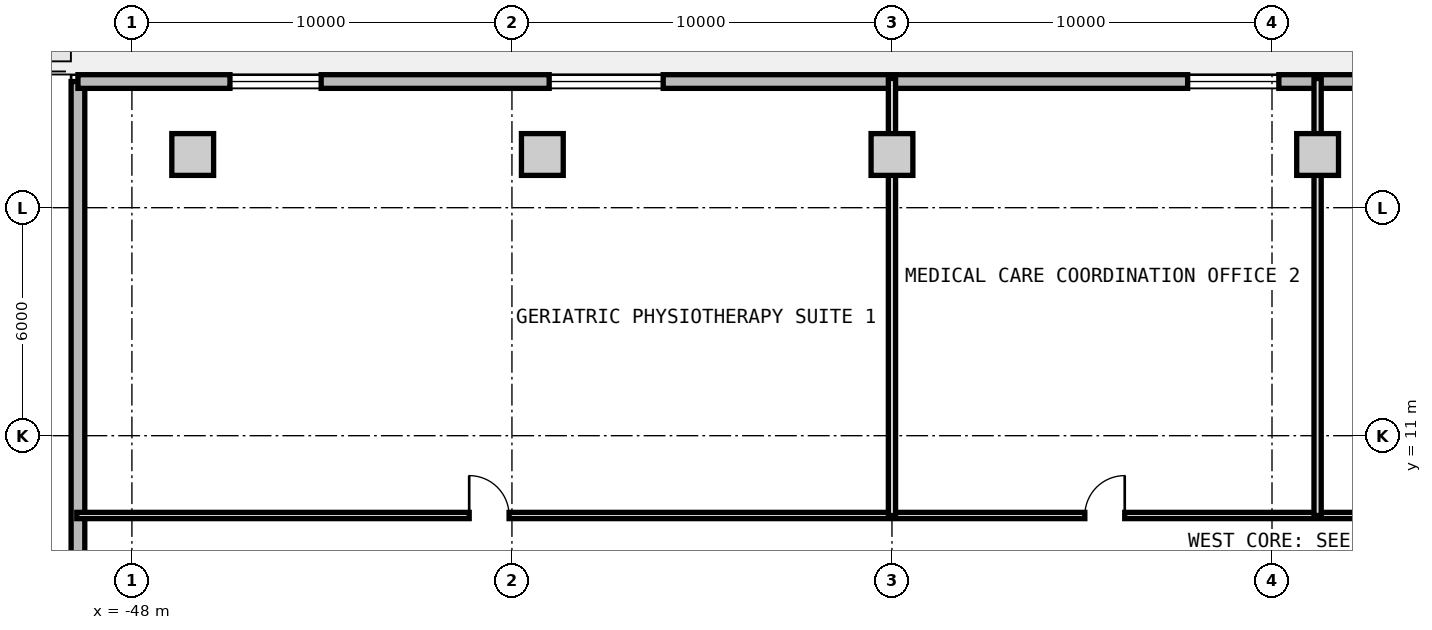
"""IFC4 building model, lengths in metres.
Left out: names, types, materials, properties, quantities, classifications, styles, units other than length and angle.
Written with IfcOpenShell. Run it as: python <this file> out.ifc"""

import sys

from ifc_helpers import new_model, si_unit, direction, frame, frame_2d, origin, origin_2d, place, context, subcontext, project, spatial, rectangle, extrude, source, transform, mapped, element, fill, save


model = new_model("IFC4")
c1 = context("Model", 3, precision=1e-05, world=origin(), true_north=direction((0.0, 1.0)))
c2 = subcontext(c1, "Body", "Model", "MODEL_VIEW")
j1 = project(units=[si_unit("LENGTHUNIT", "METRE"), si_unit("PLANEANGLEUNIT", "RADIAN")], contexts=[c1])
p1 = place(None, origin())
s1 = spatial("IfcSite", under=j1, at=p1, CompositionType="ELEMENT")
p2 = place(p1, origin())
s2 = spatial("IfcBuilding", under=s1, at=p2, CompositionType="ELEMENT")
p3 = place(p2, frame((0.0, 0.0, 12.6)))
s3 = spatial("IfcBuildingStorey", under=s2, at=p3, CompositionType="ELEMENT", Elevation=12.6)
m1 = source(origin(), c2, "Body", "SweptSolid", [
    extrude(rectangle(XDim=1.1, YDim=1.1, at=origin_2d()), origin(), (0.0, 0.0, 1.0), 4.2),
])
for number, where, z_axis, x_axis in (
    (1, (-46.4, 18.4, 0.0), (0.0, 0.0, 1.0), (1.0, 0.0, 0.0)),
    (2, (-37.2, 18.4, 0.0), (0.0, 0.0, 1.0), (1.0, 0.0, 0.0)),
    (3, (-28.0, 18.4, 0.0), (0.0, 0.0, 1.0), (1.0, 0.0, 0.0)),
    (4, (-16.8, 18.4, 0.0), (0.0, 0.0, 1.0), (1.0, 0.0, 0.0)),
):
    element("IfcColumn", number, at=place(p3, frame(where, z_axis=z_axis, x_axis=x_axis)), inside=s3, PredefinedType="COLUMN", context=c2, shape_type="MappedRepresentation", body=[
        mapped(m1, transform((0.0, 0.0, 0.0), x_axis=(1.0, 0.0, 0.0), y_axis=(0.0, 1.0, 0.0), z_axis=(0.0, 0.0, 1.0), scale=1.0)),
    ])
m2 = source(origin(), c2, "Body", "SweptSolid", [
    extrude(rectangle(XDim=40.64, YDim=0.36, at=frame_2d((20.32, 0.0))), origin(), (0.0, 0.0, 1.0), 3.88),
])
p4 = place(p3, frame((-49.42, -20.32, 0.0), z_axis=(0.0, 0.0, 1.0), x_axis=(0.0, 1.0, 0.0)))
e5 = element("IfcWall", 5, at=p4, inside=s3, PredefinedType="SOLIDWALL", context=c2, shape_type="MappedRepresentation", body=[
    mapped(m2, transform((0.0, 0.0, 0.0), x_axis=(1.0, 0.0, 0.0), y_axis=(0.0, 1.0, 0.0), z_axis=(0.0, 0.0, 1.0), scale=1.0)),
])
p5 = place(p4, frame((12.4, 0.0, 0.85)))
e6 = element("IfcOpeningElement", 6, at=p5, cuts=e5, PredefinedType="OPENING", context=c2, shape_type="SweptSolid", body=[
    extrude(rectangle(XDim=3.0, YDim=2.1, at=frame_2d((1.5, 1.05))), frame((0.0, 0.19, 0.0), z_axis=(0.0, -1.0, 0.0), x_axis=(1.0, 0.0, 0.0)), (0.0, 0.0, 1.0), 0.38),
])
m3 = source(origin(), c2, "Body", "SweptSolid", [
    extrude(rectangle(XDim=98.84, YDim=0.36, at=frame_2d((49.42, 0.0))), origin(), (0.0, 0.0, 1.0), 3.88),
])
p6 = place(p3, frame((-49.42, 20.32, 0.0), z_axis=(0.0, 0.0, 1.0), x_axis=(1.0, 0.0, 0.0)))
e7 = element("IfcWall", 7, at=p6, inside=s3, PredefinedType="SOLIDWALL", context=c2, shape_type="MappedRepresentation", body=[
    mapped(m3, transform((0.0, 0.0, 0.0), x_axis=(1.0, 0.0, 0.0), y_axis=(0.0, 1.0, 0.0), z_axis=(0.0, 0.0, 1.0), scale=1.0)),
])
p7 = place(p6, frame((45.92, 0.0, 0.0)))
e8 = element("IfcOpeningElement", 8, at=p7, cuts=e7, PredefinedType="OPENING", context=c2, shape_type="SweptSolid", body=[
    extrude(rectangle(XDim=1.15, YDim=2.25, at=frame_2d((0.575, 1.125))), frame((0.0, 0.19, 0.0), z_axis=(0.0, -1.0, 0.0), x_axis=(1.0, 0.0, 0.0)), (0.0, 0.0, 1.0), 0.38),
])
p8 = place(p6, frame((4.0, 0.0, 0.85)))
e9 = element("IfcOpeningElement", 9, at=p8, cuts=e7, PredefinedType="OPENING", context=c2, shape_type="SweptSolid", body=[
    extrude(rectangle(XDim=2.4, YDim=2.2, at=frame_2d((1.2, 1.1))), frame((0.0, 0.19, 0.0), z_axis=(0.0, -1.0, 0.0), x_axis=(1.0, 0.0, 0.0)), (0.0, 0.0, 1.0), 0.38),
])
p9 = place(p6, frame((12.4, 0.0, 0.85)))
e10 = element("IfcOpeningElement", 10, at=p9, cuts=e7, PredefinedType="OPENING", context=c2, shape_type="SweptSolid", body=[
    extrude(rectangle(XDim=3.0, YDim=2.1, at=frame_2d((1.5, 1.05))), frame((0.0, 0.19, 0.0), z_axis=(0.0, -1.0, 0.0), x_axis=(1.0, 0.0, 0.0)), (0.0, 0.0, 1.0), 0.38),
])
p10 = place(p6, frame((29.2, 0.0, 0.85)))
e11 = element("IfcOpeningElement", 11, at=p10, cuts=e7, PredefinedType="OPENING", context=c2, shape_type="SweptSolid", body=[
    extrude(rectangle(XDim=2.4, YDim=2.2, at=frame_2d((1.2, 1.1))), frame((0.0, 0.19, 0.0), z_axis=(0.0, -1.0, 0.0), x_axis=(1.0, 0.0, 0.0)), (0.0, 0.0, 1.0), 0.38),
])
p11 = place(p6, frame((37.6, 0.0, 0.85)))
e12 = element("IfcOpeningElement", 12, at=p11, cuts=e7, PredefinedType="OPENING", context=c2, shape_type="SweptSolid", body=[
    extrude(rectangle(XDim=3.0, YDim=2.1, at=frame_2d((1.5, 1.05))), frame((0.0, 0.19, 0.0), z_axis=(0.0, -1.0, 0.0), x_axis=(1.0, 0.0, 0.0)), (0.0, 0.0, 1.0), 0.38),
])
p12 = place(p6, frame((62.8, 0.0, 0.85)))
e13 = element("IfcOpeningElement", 13, at=p12, cuts=e7, PredefinedType="OPENING", context=c2, shape_type="SweptSolid", body=[
    extrude(rectangle(XDim=3.0, YDim=2.1, at=frame_2d((1.5, 1.05))), frame((0.0, 0.19, 0.0), z_axis=(0.0, -1.0, 0.0), x_axis=(1.0, 0.0, 0.0)), (0.0, 0.0, 1.0), 0.38),
])
p13 = place(p6, frame((71.2, 0.0, 0.9)))
e14 = element("IfcOpeningElement", 14, at=p13, cuts=e7, PredefinedType="OPENING", context=c2, shape_type="SweptSolid", body=[
    extrude(rectangle(XDim=1.8, YDim=2.0, at=frame_2d((0.9, 1.0))), frame((0.0, 0.19, 0.0), z_axis=(0.0, -1.0, 0.0), x_axis=(1.0, 0.0, 0.0)), (0.0, 0.0, 1.0), 0.38),
])
p14 = place(p6, frame((79.6, 0.0, 0.85)))
e15 = element("IfcOpeningElement", 15, at=p14, cuts=e7, PredefinedType="OPENING", context=c2, shape_type="SweptSolid", body=[
    extrude(rectangle(XDim=2.4, YDim=2.2, at=frame_2d((1.2, 1.1))), frame((0.0, 0.19, 0.0), z_axis=(0.0, -1.0, 0.0), x_axis=(1.0, 0.0, 0.0)), (0.0, 0.0, 1.0), 0.38),
])
m4 = source(origin(), c2, "Body", "SweptSolid", [
    extrude(rectangle(XDim=98.9, YDim=0.165, at=frame_2d((49.45, 0.0))), origin(), (0.0, 0.0, 1.0), 3.865),
])
p15 = place(p3, frame((-49.45, 8.9, 0.0), z_axis=(0.0, 0.0, 1.0), x_axis=(1.0, 0.0, 0.0)))
e16 = element("IfcWall", 16, at=p15, inside=s3, PredefinedType="PARTITIONING", context=c2, shape_type="MappedRepresentation", body=[
    mapped(m4, transform((0.0, 0.0, 0.0), x_axis=(1.0, 0.0, 0.0), y_axis=(0.0, 1.0, 0.0), z_axis=(0.0, 0.0, 1.0), scale=1.0)),
])
p16 = place(p15, frame((10.325, 0.0, 0.0)))
e17 = element("IfcOpeningElement", 17, at=p16, cuts=e16, PredefinedType="OPENING", context=c2, shape_type="SweptSolid", body=[
    extrude(rectangle(XDim=1.05, YDim=2.15, at=frame_2d((0.525, 1.075))), frame((0.0, 0.093, 0.0), z_axis=(0.0, -1.0, 0.0), x_axis=(1.0, 0.0, 0.0)), (0.0, 0.0, 1.0), 0.185),
])
p17 = place(p15, frame((26.525, 0.0, 0.0)))
e18 = element("IfcOpeningElement", 18, at=p17, cuts=e16, PredefinedType="OPENING", context=c2, shape_type="SweptSolid", body=[
    extrude(rectangle(XDim=1.05, YDim=2.15, at=frame_2d((0.525, 1.075))), frame((0.0, 0.093, 0.0), z_axis=(0.0, -1.0, 0.0), x_axis=(1.0, 0.0, 0.0)), (0.0, 0.0, 1.0), 0.185),
])
p18 = place(p15, frame((43.775, 0.0, 0.0)))
e19 = element("IfcOpeningElement", 19, at=p18, cuts=e16, PredefinedType="OPENING", context=c2, shape_type="SweptSolid", body=[
    extrude(rectangle(XDim=1.05, YDim=2.15, at=frame_2d((0.525, 1.075))), frame((0.0, 0.093, 0.0), z_axis=(0.0, -1.0, 0.0), x_axis=(1.0, 0.0, 0.0)), (0.0, 0.0, 1.0), 0.185),
])
p19 = place(p15, frame((66.175, 0.0, 0.0)))
e20 = element("IfcOpeningElement", 20, at=p19, cuts=e16, PredefinedType="OPENING", context=c2, shape_type="SweptSolid", body=[
    extrude(rectangle(XDim=1.05, YDim=2.15, at=frame_2d((0.525, 1.075))), frame((0.0, 0.093, 0.0), z_axis=(0.0, -1.0, 0.0), x_axis=(1.0, 0.0, 0.0)), (0.0, 0.0, 1.0), 0.185),
])
p20 = place(p15, frame((87.525, 0.0, 0.0)))
e21 = element("IfcOpeningElement", 21, at=p20, cuts=e16, PredefinedType="OPENING", context=c2, shape_type="SweptSolid", body=[
    extrude(rectangle(XDim=1.05, YDim=2.15, at=frame_2d((0.525, 1.075))), frame((0.0, 0.093, 0.0), z_axis=(0.0, -1.0, 0.0), x_axis=(1.0, 0.0, 0.0)), (0.0, 0.0, 1.0), 0.185),
])
m5 = source(origin(), c2, "Body", "SweptSolid", [
    extrude(rectangle(XDim=11.5, YDim=0.19, at=frame_2d((5.75, 0.0))), origin(), (0.0, 0.0, 1.0), 3.865),
])
for number, where, z_axis, x_axis in (
    (22, (-28.0, 8.9, 0.0), (0.0, 0.0, 1.0), (0.0, 1.0, 0.0)),
    (23, (-16.8, 8.9, 0.0), (0.0, 0.0, 1.0), (0.0, 1.0, 0.0)),
):
    element("IfcWall", number, at=place(p3, frame(where, z_axis=z_axis, x_axis=x_axis)), inside=s3, PredefinedType="PARTITIONING", context=c2, shape_type="MappedRepresentation", body=[
        mapped(m5, transform((0.0, 0.0, 0.0), x_axis=(1.0, 0.0, 0.0), y_axis=(0.0, 1.0, 0.0), z_axis=(0.0, 0.0, 1.0), scale=1.0)),
    ])
m6 = source(origin(), c2, "Body", "SweptSolid", [
    extrude(rectangle(XDim=2.4, YDim=2.2, at=frame_2d((1.2, 1.1))), frame((0.0, 0.03, 0.0), z_axis=(0.0, -1.0, 0.0), x_axis=(1.0, 0.0, 0.0)), (0.0, 0.0, 1.0), 0.06),
])
p21 = place(p8, origin())
e24 = element("IfcWindow", 24, at=p21, inside=s3, PartitioningType="SINGLE_PANEL", PredefinedType="WINDOW", context=c2, shape_type="MappedRepresentation", body=[
    mapped(m6, transform((0.0, 0.0, 0.0), x_axis=(1.0, 0.0, 0.0), y_axis=(0.0, 1.0, 0.0), z_axis=(0.0, 0.0, 1.0), scale=1.0)),
])
fill(e9, e24)
m7 = source(origin(), c2, "Body", "SweptSolid", [
    extrude(rectangle(XDim=3.0, YDim=2.1, at=frame_2d((1.5, 1.05))), frame((0.0, 0.03, 0.0), z_axis=(0.0, -1.0, 0.0), x_axis=(1.0, 0.0, 0.0)), (0.0, 0.0, 1.0), 0.06),
])
p22 = place(p9, origin())
e25 = element("IfcWindow", 25, at=p22, inside=s3, PartitioningType="SINGLE_PANEL", PredefinedType="WINDOW", context=c2, shape_type="MappedRepresentation", body=[
    mapped(m7, transform((0.0, 0.0, 0.0), x_axis=(1.0, 0.0, 0.0), y_axis=(0.0, 1.0, 0.0), z_axis=(0.0, 0.0, 1.0), scale=1.0)),
])
fill(e10, e25)
p23 = place(p10, origin())
e26 = element("IfcWindow", 26, at=p23, inside=s3, PartitioningType="SINGLE_PANEL", PredefinedType="WINDOW", context=c2, shape_type="MappedRepresentation", body=[
    mapped(m6, transform((0.0, 0.0, 0.0), x_axis=(1.0, 0.0, 0.0), y_axis=(0.0, 1.0, 0.0), z_axis=(0.0, 0.0, 1.0), scale=1.0)),
])
fill(e11, e26)
m8 = source(origin(), c2, "Body", "SweptSolid", [
    extrude(rectangle(XDim=1.05, YDim=2.15, at=frame_2d((0.525, 1.075))), frame((0.0, 0.025, 0.0), z_axis=(0.0, -1.0, 0.0), x_axis=(1.0, 0.0, 0.0)), (0.0, 0.0, 1.0), 0.05),
])
p24 = place(p16, origin())
e27 = element("IfcDoor", 27, at=p24, inside=s3, OperationType="SINGLE_SWING_LEFT", PredefinedType="DOOR", context=c2, shape_type="MappedRepresentation", body=[
    mapped(m8, transform((0.0, 0.0, 0.0), x_axis=(1.0, 0.0, 0.0), y_axis=(0.0, 1.0, 0.0), z_axis=(0.0, 0.0, 1.0), scale=1.0)),
])
fill(e17, e27)
p25 = place(p17, origin())
e28 = element("IfcDoor", 28, at=p25, inside=s3, OperationType="SINGLE_SWING_RIGHT", PredefinedType="DOOR", context=c2, shape_type="MappedRepresentation", body=[
    mapped(m8, transform((0.0, 0.0, 0.0), x_axis=(1.0, 0.0, 0.0), y_axis=(0.0, 1.0, 0.0), z_axis=(0.0, 0.0, 1.0), scale=1.0)),
])
fill(e18, e28)
save(model, sys.argv[1])
